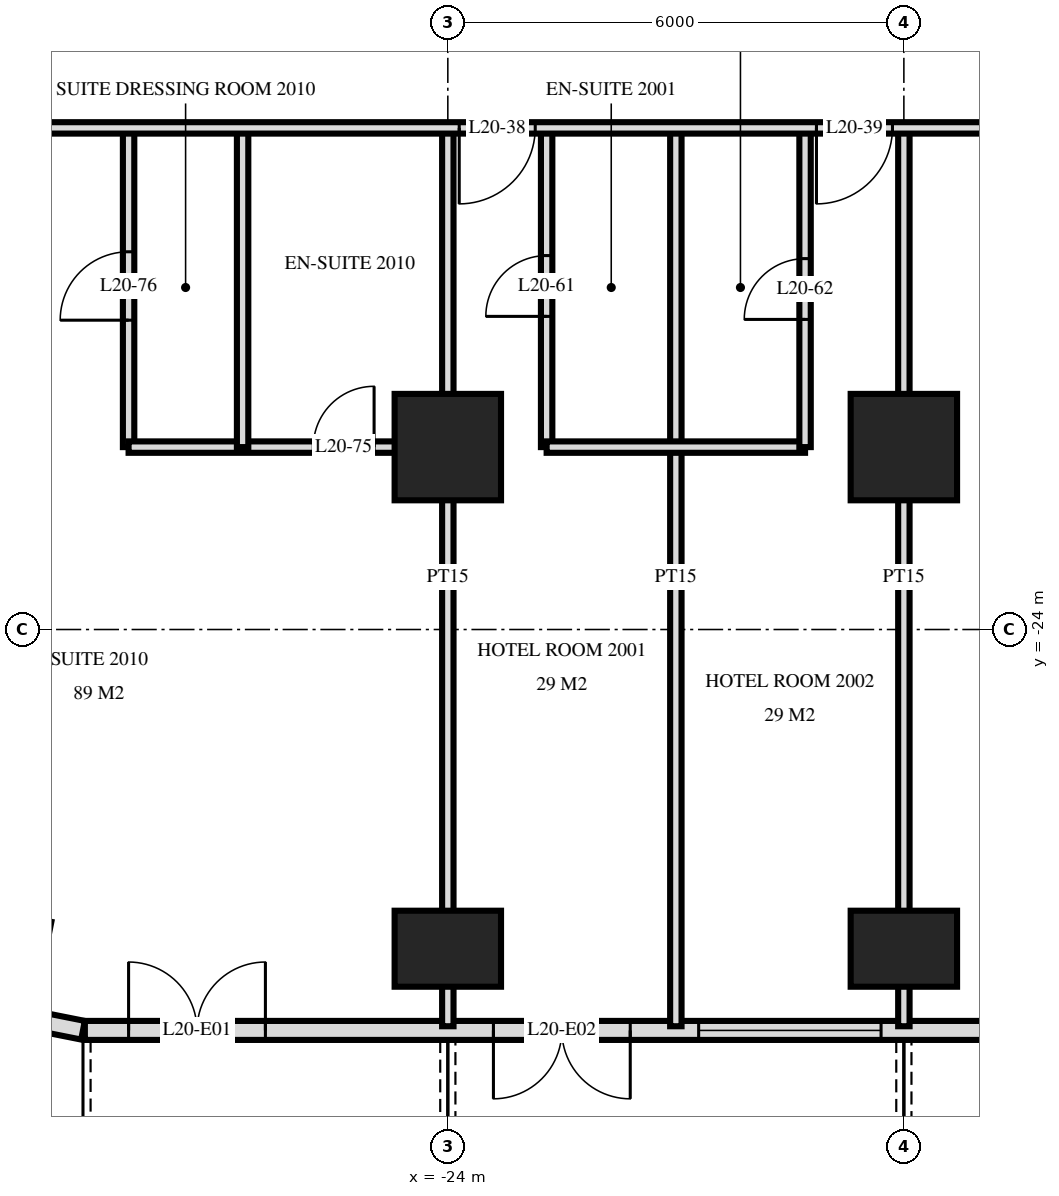
"""IFC4 building model, lengths in metres.
Left out: names, types, materials, properties, quantities, classifications, styles, units other than length and angle.
Written with IfcOpenShell. Run it as: python <this file> out.ifc"""

import sys

from ifc_helpers import new_model, si_unit, direction, frame, frame_2d, origin, origin_2d, place, context, subcontext, project, spatial, rectangle, extrude, element, fill, save


model = new_model("IFC4")
c1 = context("Model", 3, precision=1e-05, world=origin(), true_north=direction((0.0, 1.0)))
c2 = subcontext(c1, "Body", "Model", "MODEL_VIEW")
j1 = project(units=[si_unit("LENGTHUNIT", "METRE"), si_unit("PLANEANGLEUNIT", "RADIAN")], contexts=[c1])
p1 = place(None, origin())
s1 = spatial("IfcSite", under=j1, at=p1, CompositionType="ELEMENT")
p2 = place(p1, origin())
s2 = spatial("IfcBuilding", under=s1, at=p2, CompositionType="ELEMENT")
p3 = place(p2, frame((0.0, 0.0, 81.6)))
s3 = spatial("IfcBuildingStorey", under=s2, at=p3, CompositionType="ELEMENT", Elevation=81.6)
p4 = place(p3, frame((-24.0, -28.2, 0.0), z_axis=(0.0, 0.0, 1.0), x_axis=(1.0, 0.0, 0.0)))
e1 = element("IfcColumn", 1, at=p4, inside=s3, PredefinedType="COLUMN", context=c2, shape_type="SweptSolid", body=[
    extrude(rectangle(XDim=1.4, YDim=1.0, at=origin_2d()), origin(), (0.0, 0.0, 1.0), 3.6),
])
p5 = place(p3, frame((-24.0, -21.6, 0.0), z_axis=(0.0, 0.0, 1.0), x_axis=(1.0, 0.0, 0.0)))
e2 = element("IfcColumn", 2, at=p5, inside=s3, PredefinedType="COLUMN", context=c2, shape_type="SweptSolid", body=[
    extrude(rectangle(XDim=1.4, YDim=1.4, at=origin_2d()), origin(), (0.0, 0.0, 1.0), 3.6),
])
p6 = place(p3, frame((-18.0, -28.2, 0.0), z_axis=(0.0, 0.0, 1.0), x_axis=(1.0, 0.0, 0.0)))
e3 = element("IfcColumn", 3, at=p6, inside=s3, PredefinedType="COLUMN", context=c2, shape_type="SweptSolid", body=[
    extrude(rectangle(XDim=1.4, YDim=1.0, at=origin_2d()), origin(), (0.0, 0.0, 1.0), 3.6),
])
p7 = place(p3, frame((-18.0, -21.6, 0.0), z_axis=(0.0, 0.0, 1.0), x_axis=(1.0, 0.0, 0.0)))
e4 = element("IfcColumn", 4, at=p7, inside=s3, PredefinedType="COLUMN", context=c2, shape_type="SweptSolid", body=[
    extrude(rectangle(XDim=1.4, YDim=1.4, at=origin_2d()), origin(), (0.0, 0.0, 1.0), 3.6),
])
p8 = place(p3, frame((-30.449, -28.945, 0.0), z_axis=(0.0, 0.0, 1.0), x_axis=(0.980775640221, -0.19513878023, 0.0)))
e5 = element("IfcWall", 5, at=p8, inside=s3, PredefinedType="SOLIDWALL", context=c2, shape_type="SweptSolid", body=[
    extrude(rectangle(XDim=1.681, YDim=0.25, at=frame_2d((0.841, 0.0))), origin(), (0.0, 0.0, 1.0), 3.32),
])
p9 = place(p3, frame((-28.775, -29.275, 0.0), z_axis=(0.0, 0.0, 1.0), x_axis=(1.0, 0.0, 0.0)))
e6 = element("IfcWall", 6, at=p9, inside=s3, PredefinedType="SOLIDWALL", context=c2, shape_type="SweptSolid", body=[
    extrude(rectangle(XDim=57.551, YDim=0.25, at=frame_2d((28.775, 0.0))), origin(), (0.0, 0.0, 1.0), 3.32),
])
p10 = place(p9, frame((0.575, 0.0, 0.0)))
e7 = element("IfcOpeningElement", 7, at=p10, cuts=e6, PredefinedType="OPENING", context=c2, shape_type="SweptSolid", body=[
    extrude(rectangle(XDim=1.8, YDim=2.4, at=frame_2d((0.9, 1.2))), frame((0.0, 0.135, 0.0), z_axis=(0.0, -1.0, 0.0), x_axis=(1.0, 0.0, 0.0)), (0.0, 0.0, 1.0), 0.27),
])
p11 = place(p9, frame((5.375, 0.0, 0.0)))
e8 = element("IfcOpeningElement", 8, at=p11, cuts=e6, PredefinedType="OPENING", context=c2, shape_type="SweptSolid", body=[
    extrude(rectangle(XDim=1.8, YDim=2.4, at=frame_2d((0.9, 1.2))), frame((0.0, 0.135, 0.0), z_axis=(0.0, -1.0, 0.0), x_axis=(1.0, 0.0, 0.0)), (0.0, 0.0, 1.0), 0.27),
])
p12 = place(p9, frame((8.075, 0.0, 0.3)))
e9 = element("IfcOpeningElement", 9, at=p12, cuts=e6, PredefinedType="OPENING", context=c2, shape_type="SweptSolid", body=[
    extrude(rectangle(XDim=2.4, YDim=2.1, at=frame_2d((1.2, 1.05))), frame((0.0, 0.135, 0.0), z_axis=(0.0, -1.0, 0.0), x_axis=(1.0, 0.0, 0.0)), (0.0, 0.0, 1.0), 0.27),
])
p13 = place(p9, frame((12.875, 0.0, 0.0)))
e10 = element("IfcOpeningElement", 10, at=p13, cuts=e6, PredefinedType="OPENING", context=c2, shape_type="SweptSolid", body=[
    extrude(rectangle(XDim=1.8, YDim=2.4, at=frame_2d((0.9, 1.2))), frame((0.0, 0.135, 0.0), z_axis=(0.0, -1.0, 0.0), x_axis=(1.0, 0.0, 0.0)), (0.0, 0.0, 1.0), 0.27),
])
p14 = place(p9, frame((17.375, 0.0, 0.0)))
e11 = element("IfcOpeningElement", 11, at=p14, cuts=e6, PredefinedType="OPENING", context=c2, shape_type="SweptSolid", body=[
    extrude(rectangle(XDim=1.8, YDim=2.4, at=frame_2d((0.9, 1.2))), frame((0.0, 0.135, 0.0), z_axis=(0.0, -1.0, 0.0), x_axis=(1.0, 0.0, 0.0)), (0.0, 0.0, 1.0), 0.27),
])
p15 = place(p9, frame((20.075, 0.0, 0.3)))
e12 = element("IfcOpeningElement", 12, at=p15, cuts=e6, PredefinedType="OPENING", context=c2, shape_type="SweptSolid", body=[
    extrude(rectangle(XDim=2.4, YDim=2.1, at=frame_2d((1.2, 1.05))), frame((0.0, 0.135, 0.0), z_axis=(0.0, -1.0, 0.0), x_axis=(1.0, 0.0, 0.0)), (0.0, 0.0, 1.0), 0.27),
])
p16 = place(p9, frame((23.075, 0.0, 0.3)))
e13 = element("IfcOpeningElement", 13, at=p16, cuts=e6, PredefinedType="OPENING", context=c2, shape_type="SweptSolid", body=[
    extrude(rectangle(XDim=2.4, YDim=2.1, at=frame_2d((1.2, 1.05))), frame((0.0, 0.135, 0.0), z_axis=(0.0, -1.0, 0.0), x_axis=(1.0, 0.0, 0.0)), (0.0, 0.0, 1.0), 0.27),
])
p17 = place(p9, frame((26.375, 0.0, 0.0)))
e14 = element("IfcOpeningElement", 14, at=p17, cuts=e6, PredefinedType="OPENING", context=c2, shape_type="SweptSolid", body=[
    extrude(rectangle(XDim=1.8, YDim=2.4, at=frame_2d((0.9, 1.2))), frame((0.0, 0.135, 0.0), z_axis=(0.0, -1.0, 0.0), x_axis=(1.0, 0.0, 0.0)), (0.0, 0.0, 1.0), 0.27),
])
p18 = place(p9, frame((29.075, 0.0, 0.3)))
e15 = element("IfcOpeningElement", 15, at=p18, cuts=e6, PredefinedType="OPENING", context=c2, shape_type="SweptSolid", body=[
    extrude(rectangle(XDim=2.4, YDim=2.1, at=frame_2d((1.2, 1.05))), frame((0.0, 0.135, 0.0), z_axis=(0.0, -1.0, 0.0), x_axis=(1.0, 0.0, 0.0)), (0.0, 0.0, 1.0), 0.27),
])
p19 = place(p9, frame((32.375, 0.0, 0.0)))
e16 = element("IfcOpeningElement", 16, at=p19, cuts=e6, PredefinedType="OPENING", context=c2, shape_type="SweptSolid", body=[
    extrude(rectangle(XDim=1.8, YDim=2.4, at=frame_2d((0.9, 1.2))), frame((0.0, 0.135, 0.0), z_axis=(0.0, -1.0, 0.0), x_axis=(1.0, 0.0, 0.0)), (0.0, 0.0, 1.0), 0.27),
])
p20 = place(p9, frame((35.375, 0.0, 0.0)))
e17 = element("IfcOpeningElement", 17, at=p20, cuts=e6, PredefinedType="OPENING", context=c2, shape_type="SweptSolid", body=[
    extrude(rectangle(XDim=1.8, YDim=2.4, at=frame_2d((0.9, 1.2))), frame((0.0, 0.135, 0.0), z_axis=(0.0, -1.0, 0.0), x_axis=(1.0, 0.0, 0.0)), (0.0, 0.0, 1.0), 0.27),
])
p21 = place(p9, frame((38.075, 0.0, 0.3)))
e18 = element("IfcOpeningElement", 18, at=p21, cuts=e6, PredefinedType="OPENING", context=c2, shape_type="SweptSolid", body=[
    extrude(rectangle(XDim=2.4, YDim=2.1, at=frame_2d((1.2, 1.05))), frame((0.0, 0.135, 0.0), z_axis=(0.0, -1.0, 0.0), x_axis=(1.0, 0.0, 0.0)), (0.0, 0.0, 1.0), 0.27),
])
p22 = place(p9, frame((41.375, 0.0, 0.0)))
e19 = element("IfcOpeningElement", 19, at=p22, cuts=e6, PredefinedType="OPENING", context=c2, shape_type="SweptSolid", body=[
    extrude(rectangle(XDim=1.8, YDim=2.4, at=frame_2d((0.9, 1.2))), frame((0.0, 0.135, 0.0), z_axis=(0.0, -1.0, 0.0), x_axis=(1.0, 0.0, 0.0)), (0.0, 0.0, 1.0), 0.27),
])
p23 = place(p9, frame((44.075, 0.0, 0.3)))
e20 = element("IfcOpeningElement", 20, at=p23, cuts=e6, PredefinedType="OPENING", context=c2, shape_type="SweptSolid", body=[
    extrude(rectangle(XDim=2.4, YDim=2.1, at=frame_2d((1.2, 1.05))), frame((0.0, 0.135, 0.0), z_axis=(0.0, -1.0, 0.0), x_axis=(1.0, 0.0, 0.0)), (0.0, 0.0, 1.0), 0.27),
])
p24 = place(p9, frame((47.075, 0.0, 0.3)))
e21 = element("IfcOpeningElement", 21, at=p24, cuts=e6, PredefinedType="OPENING", context=c2, shape_type="SweptSolid", body=[
    extrude(rectangle(XDim=2.4, YDim=2.1, at=frame_2d((1.2, 1.05))), frame((0.0, 0.135, 0.0), z_axis=(0.0, -1.0, 0.0), x_axis=(1.0, 0.0, 0.0)), (0.0, 0.0, 1.0), 0.27),
])
p25 = place(p9, frame((50.375, 0.0, 0.0)))
e22 = element("IfcOpeningElement", 22, at=p25, cuts=e6, PredefinedType="OPENING", context=c2, shape_type="SweptSolid", body=[
    extrude(rectangle(XDim=1.8, YDim=2.4, at=frame_2d((0.9, 1.2))), frame((0.0, 0.135, 0.0), z_axis=(0.0, -1.0, 0.0), x_axis=(1.0, 0.0, 0.0)), (0.0, 0.0, 1.0), 0.27),
])
p26 = place(p9, frame((53.375, 0.0, 0.0)))
e23 = element("IfcOpeningElement", 23, at=p26, cuts=e6, PredefinedType="OPENING", context=c2, shape_type="SweptSolid", body=[
    extrude(rectangle(XDim=1.8, YDim=2.4, at=frame_2d((0.9, 1.2))), frame((0.0, 0.135, 0.0), z_axis=(0.0, -1.0, 0.0), x_axis=(1.0, 0.0, 0.0)), (0.0, 0.0, 1.0), 0.27),
])
p27 = place(p3, frame((-18.0, -29.22, 0.0), z_axis=(0.0, 0.0, 1.0), x_axis=(0.0, 1.0, 0.0)))
e24 = element("IfcWall", 24, at=p27, inside=s3, PredefinedType="PARTITIONING", context=c2, shape_type="SweptSolid", body=[
    extrude(rectangle(XDim=11.82, YDim=0.15, at=frame_2d((5.91, 0.0))), origin(), (0.0, 0.0, 1.0), 3.32),
])
p28 = place(p3, frame((-19.3, -21.6, 0.0), z_axis=(0.0, 0.0, 1.0), x_axis=(0.0, 1.0, 0.0)))
e25 = element("IfcWall", 25, at=p28, inside=s3, PredefinedType="PARTITIONING", context=c2, shape_type="SweptSolid", body=[
    extrude(rectangle(XDim=4.2, YDim=0.15, at=frame_2d((2.1, 0.0))), origin(), (0.0, 0.0, 1.0), 3.32),
])
p29 = place(p28, frame((1.68, 0.0, 0.0)))
e26 = element("IfcOpeningElement", 26, at=p29, cuts=e25, PredefinedType="OPENING", context=c2, shape_type="SweptSolid", body=[
    extrude(rectangle(XDim=0.8, YDim=2.1, at=frame_2d((0.4, 1.05))), frame((0.0, 0.085, 0.0), z_axis=(0.0, -1.0, 0.0), x_axis=(1.0, 0.0, 0.0)), (0.0, 0.0, 1.0), 0.17),
])
p30 = place(p3, frame((-21.0, -29.22, 0.0), z_axis=(0.0, 0.0, 1.0), x_axis=(0.0, 1.0, 0.0)))
e27 = element("IfcWall", 27, at=p30, inside=s3, PredefinedType="PARTITIONING", context=c2, shape_type="SweptSolid", body=[
    extrude(rectangle(XDim=11.82, YDim=0.15, at=frame_2d((5.91, 0.0))), origin(), (0.0, 0.0, 1.0), 3.32),
])
p31 = place(p3, frame((-22.7, -21.6, 0.0), z_axis=(0.0, 0.0, 1.0), x_axis=(0.0, 1.0, 0.0)))
e28 = element("IfcWall", 28, at=p31, inside=s3, PredefinedType="PARTITIONING", context=c2, shape_type="SweptSolid", body=[
    extrude(rectangle(XDim=4.2, YDim=0.15, at=frame_2d((2.1, 0.0))), origin(), (0.0, 0.0, 1.0), 3.32),
])
p32 = place(p31, frame((1.72, 0.0, 0.0)))
e29 = element("IfcOpeningElement", 29, at=p32, cuts=e28, PredefinedType="OPENING", context=c2, shape_type="SweptSolid", body=[
    extrude(rectangle(XDim=0.8, YDim=2.1, at=frame_2d((0.4, 1.05))), frame((0.0, 0.085, 0.0), z_axis=(0.0, -1.0, 0.0), x_axis=(1.0, 0.0, 0.0)), (0.0, 0.0, 1.0), 0.17),
])
p33 = place(p3, frame((-24.0, -29.22, 0.0), z_axis=(0.0, 0.0, 1.0), x_axis=(0.0, 1.0, 0.0)))
e30 = element("IfcWall", 30, at=p33, inside=s3, PredefinedType="PARTITIONING", context=c2, shape_type="SweptSolid", body=[
    extrude(rectangle(XDim=11.82, YDim=0.15, at=frame_2d((5.91, 0.0))), origin(), (0.0, 0.0, 1.0), 3.32),
])
p34 = place(p3, frame((-26.7, -21.6, 0.0), z_axis=(0.0, 0.0, 1.0), x_axis=(0.0, 1.0, 0.0)))
e31 = element("IfcWall", 31, at=p34, inside=s3, PredefinedType="PARTITIONING", context=c2, shape_type="SweptSolid", body=[
    extrude(rectangle(XDim=4.2, YDim=0.15, at=frame_2d((2.1, 0.0))), origin(), (0.0, 0.0, 1.0), 3.32),
])
p35 = place(p3, frame((-28.2, -21.6, 0.0), z_axis=(0.0, 0.0, 1.0), x_axis=(0.0, 1.0, 0.0)))
e32 = element("IfcWall", 32, at=p35, inside=s3, PredefinedType="PARTITIONING", context=c2, shape_type="SweptSolid", body=[
    extrude(rectangle(XDim=4.2, YDim=0.15, at=frame_2d((2.1, 0.0))), origin(), (0.0, 0.0, 1.0), 3.32),
])
p36 = place(p35, frame((1.67, 0.0, 0.0)))
e33 = element("IfcOpeningElement", 33, at=p36, cuts=e32, PredefinedType="OPENING", context=c2, shape_type="SweptSolid", body=[
    extrude(rectangle(XDim=0.9, YDim=2.1, at=frame_2d((0.45, 1.05))), frame((0.0, 0.085, 0.0), z_axis=(0.0, -1.0, 0.0), x_axis=(1.0, 0.0, 0.0)), (0.0, 0.0, 1.0), 0.17),
])
p37 = place(p3, frame((-28.2, -21.6, 0.0), z_axis=(0.0, 0.0, 1.0), x_axis=(1.0, 0.0, 0.0)))
e34 = element("IfcWall", 34, at=p37, inside=s3, PredefinedType="PARTITIONING", context=c2, shape_type="SweptSolid", body=[
    extrude(rectangle(XDim=4.2, YDim=0.15, at=frame_2d((2.1, 0.0))), origin(), (0.0, 0.0, 1.0), 3.32),
])
p38 = place(p37, frame((2.43, 0.0, 0.0)))
e35 = element("IfcOpeningElement", 35, at=p38, cuts=e34, PredefinedType="OPENING", context=c2, shape_type="SweptSolid", body=[
    extrude(rectangle(XDim=0.8, YDim=2.1, at=frame_2d((0.4, 1.05))), frame((0.0, 0.085, 0.0), z_axis=(0.0, -1.0, 0.0), x_axis=(1.0, 0.0, 0.0)), (0.0, 0.0, 1.0), 0.17),
])
p39 = place(p3, frame((-22.7, -21.6, 0.0), z_axis=(0.0, 0.0, 1.0), x_axis=(1.0, 0.0, 0.0)))
e36 = element("IfcWall", 36, at=p39, inside=s3, PredefinedType="PARTITIONING", context=c2, shape_type="SweptSolid", body=[
    extrude(rectangle(XDim=3.4, YDim=0.15, at=frame_2d((1.7, 0.0))), origin(), (0.0, 0.0, 1.0), 3.32),
])
p40 = place(p3, frame((-33.12, -17.4, 0.0), z_axis=(0.0, 0.0, 1.0), x_axis=(1.0, 0.0, 0.0)))
e37 = element("IfcWall", 37, at=p40, inside=s3, PredefinedType="PARTITIONING", context=c2, shape_type="SweptSolid", body=[
    extrude(rectangle(XDim=66.24, YDim=0.15, at=frame_2d((33.12, 0.0))), origin(), (0.0, 0.0, 1.0), 3.32),
])
p41 = place(p40, frame((9.27, 0.0, 0.0)))
e38 = element("IfcOpeningElement", 38, at=p41, cuts=e37, PredefinedType="OPENING", context=c2, shape_type="SweptSolid", body=[
    extrude(rectangle(XDim=1.0, YDim=2.1, at=frame_2d((0.5, 1.05))), frame((0.0, 0.085, 0.0), z_axis=(0.0, -1.0, 0.0), x_axis=(1.0, 0.0, 0.0)), (0.0, 0.0, 1.0), 0.17),
])
p42 = place(p40, frame((13.97, 0.0, 0.0)))
e39 = element("IfcOpeningElement", 39, at=p42, cuts=e37, PredefinedType="OPENING", context=c2, shape_type="SweptSolid", body=[
    extrude(rectangle(XDim=1.0, YDim=2.1, at=frame_2d((0.5, 1.05))), frame((0.0, 0.085, 0.0), z_axis=(0.0, -1.0, 0.0), x_axis=(1.0, 0.0, 0.0)), (0.0, 0.0, 1.0), 0.17),
])
p43 = place(p40, frame((17.62, 0.0, 0.0)))
e40 = element("IfcOpeningElement", 40, at=p43, cuts=e37, PredefinedType="OPENING", context=c2, shape_type="SweptSolid", body=[
    extrude(rectangle(XDim=1.0, YDim=2.1, at=frame_2d((0.5, 1.05))), frame((0.0, 0.085, 0.0), z_axis=(0.0, -1.0, 0.0), x_axis=(1.0, 0.0, 0.0)), (0.0, 0.0, 1.0), 0.17),
])
p44 = place(p40, frame((21.27, 0.0, 0.0)))
e41 = element("IfcOpeningElement", 41, at=p44, cuts=e37, PredefinedType="OPENING", context=c2, shape_type="SweptSolid", body=[
    extrude(rectangle(XDim=1.0, YDim=2.1, at=frame_2d((0.5, 1.05))), frame((0.0, 0.085, 0.0), z_axis=(0.0, -1.0, 0.0), x_axis=(1.0, 0.0, 0.0)), (0.0, 0.0, 1.0), 0.17),
])
p45 = place(p40, frame((25.97, 0.0, 0.0)))
e42 = element("IfcOpeningElement", 42, at=p45, cuts=e37, PredefinedType="OPENING", context=c2, shape_type="SweptSolid", body=[
    extrude(rectangle(XDim=1.0, YDim=2.1, at=frame_2d((0.5, 1.05))), frame((0.0, 0.085, 0.0), z_axis=(0.0, -1.0, 0.0), x_axis=(1.0, 0.0, 0.0)), (0.0, 0.0, 1.0), 0.17),
])
p46 = place(p40, frame((35.62, 0.0, 0.0)))
e43 = element("IfcOpeningElement", 43, at=p46, cuts=e37, PredefinedType="OPENING", context=c2, shape_type="SweptSolid", body=[
    extrude(rectangle(XDim=1.0, YDim=2.1, at=frame_2d((0.5, 1.05))), frame((0.0, 0.085, 0.0), z_axis=(0.0, -1.0, 0.0), x_axis=(1.0, 0.0, 0.0)), (0.0, 0.0, 1.0), 0.17),
])
p47 = place(p40, frame((40.97, 0.0, 0.0)))
e44 = element("IfcOpeningElement", 44, at=p47, cuts=e37, PredefinedType="OPENING", context=c2, shape_type="SweptSolid", body=[
    extrude(rectangle(XDim=1.0, YDim=2.1, at=frame_2d((0.5, 1.05))), frame((0.0, 0.085, 0.0), z_axis=(0.0, -1.0, 0.0), x_axis=(1.0, 0.0, 0.0)), (0.0, 0.0, 1.0), 0.17),
])
p48 = place(p40, frame((42.27, 0.0, 0.0)))
e45 = element("IfcOpeningElement", 45, at=p48, cuts=e37, PredefinedType="OPENING", context=c2, shape_type="SweptSolid", body=[
    extrude(rectangle(XDim=1.0, YDim=2.1, at=frame_2d((0.5, 1.05))), frame((0.0, 0.085, 0.0), z_axis=(0.0, -1.0, 0.0), x_axis=(1.0, 0.0, 0.0)), (0.0, 0.0, 1.0), 0.17),
])
p49 = place(p40, frame((46.97, 0.0, 0.0)))
e46 = element("IfcOpeningElement", 46, at=p49, cuts=e37, PredefinedType="OPENING", context=c2, shape_type="SweptSolid", body=[
    extrude(rectangle(XDim=1.0, YDim=2.1, at=frame_2d((0.5, 1.05))), frame((0.0, 0.085, 0.0), z_axis=(0.0, -1.0, 0.0), x_axis=(1.0, 0.0, 0.0)), (0.0, 0.0, 1.0), 0.17),
])
p50 = place(p40, frame((48.27, 0.0, 0.0)))
e47 = element("IfcOpeningElement", 47, at=p50, cuts=e37, PredefinedType="OPENING", context=c2, shape_type="SweptSolid", body=[
    extrude(rectangle(XDim=1.0, YDim=2.1, at=frame_2d((0.5, 1.05))), frame((0.0, 0.085, 0.0), z_axis=(0.0, -1.0, 0.0), x_axis=(1.0, 0.0, 0.0)), (0.0, 0.0, 1.0), 0.17),
])
p51 = place(p40, frame((1.87, 0.0, 0.0)))
e48 = element("IfcOpeningElement", 48, at=p51, cuts=e37, PredefinedType="OPENING", context=c2, shape_type="SweptSolid", body=[
    extrude(rectangle(XDim=1.0, YDim=2.1, at=frame_2d((0.5, 1.05))), frame((0.0, 0.085, 0.0), z_axis=(0.0, -1.0, 0.0), x_axis=(1.0, 0.0, 0.0)), (0.0, 0.0, 1.0), 0.17),
])
p52 = place(p40, frame((60.37, 0.0, 0.0)))
e49 = element("IfcOpeningElement", 49, at=p52, cuts=e37, PredefinedType="OPENING", context=c2, shape_type="SweptSolid", body=[
    extrude(rectangle(XDim=1.0, YDim=2.1, at=frame_2d((0.5, 1.05))), frame((0.0, 0.085, 0.0), z_axis=(0.0, -1.0, 0.0), x_axis=(1.0, 0.0, 0.0)), (0.0, 0.0, 1.0), 0.17),
])
p53 = place(p10, origin())
e50 = element("IfcDoor", 50, at=p53, inside=s3, OperationType="DOUBLE_DOOR_SINGLE_SWING", PredefinedType="DOOR", context=c2, shape_type="SweptSolid", body=[
    extrude(rectangle(XDim=1.8, YDim=2.4, at=frame_2d((0.9, 1.2))), frame((0.0, 0.025, 0.0), z_axis=(0.0, -1.0, 0.0), x_axis=(1.0, 0.0, 0.0)), (0.0, 0.0, 1.0), 0.05),
])
fill(e7, e50)
p54 = place(p11, frame((0.9, 0.0, 0.0), z_axis=(0.0, 0.0, 1.0), x_axis=(-1.0, 0.0, 0.0)))
e51 = element("IfcDoor", 51, at=p54, inside=s3, OperationType="DOUBLE_DOOR_SINGLE_SWING", PredefinedType="DOOR", context=c2, shape_type="SweptSolid", body=[
    extrude(rectangle(XDim=1.8, YDim=2.4, at=frame_2d((0.0, 1.2))), frame((0.0, -0.025, 0.0), z_axis=(0.0, 1.0, 0.0), x_axis=(-1.0, 0.0, 0.0)), (0.0, 0.0, 1.0), 0.05),
])
fill(e8, e51)
p55 = place(p12, origin())
e52 = element("IfcWindow", 52, at=p55, inside=s3, PartitioningType="SINGLE_PANEL", PredefinedType="WINDOW", context=c2, shape_type="SweptSolid", body=[
    extrude(rectangle(XDim=2.4, YDim=2.1, at=frame_2d((1.2, 1.05))), frame((0.0, 0.03, 0.0), z_axis=(0.0, -1.0, 0.0), x_axis=(1.0, 0.0, 0.0)), (0.0, 0.0, 1.0), 0.06),
])
fill(e9, e52)
p56 = place(p41, frame((0.5, 0.0, 0.0), z_axis=(0.0, 0.0, 1.0), x_axis=(-1.0, 0.0, 0.0)))
e53 = element("IfcDoor", 53, at=p56, inside=s3, OperationType="SINGLE_SWING_LEFT", PredefinedType="DOOR", context=c2, shape_type="SweptSolid", body=[
    extrude(rectangle(XDim=1.0, YDim=2.1, at=frame_2d((0.0, 1.05))), frame((0.0, -0.025, 0.0), z_axis=(0.0, 1.0, 0.0), x_axis=(-1.0, 0.0, 0.0)), (0.0, 0.0, 1.0), 0.05),
])
fill(e38, e53)
p57 = place(p42, frame((0.5, 0.0, 0.0), z_axis=(0.0, 0.0, 1.0), x_axis=(-1.0, 0.0, 0.0)))
e54 = element("IfcDoor", 54, at=p57, inside=s3, OperationType="SINGLE_SWING_LEFT", PredefinedType="DOOR", context=c2, shape_type="SweptSolid", body=[
    extrude(rectangle(XDim=1.0, YDim=2.1, at=frame_2d((0.0, 1.05))), frame((0.0, -0.025, 0.0), z_axis=(0.0, 1.0, 0.0), x_axis=(-1.0, 0.0, 0.0)), (0.0, 0.0, 1.0), 0.05),
])
fill(e39, e54)
p58 = place(p32, origin())
e55 = element("IfcDoor", 55, at=p58, inside=s3, OperationType="SINGLE_SWING_RIGHT", PredefinedType="DOOR", context=c2, shape_type="SweptSolid", body=[
    extrude(rectangle(XDim=0.8, YDim=2.1, at=frame_2d((0.4, 1.05))), frame((0.0, 0.025, 0.0), z_axis=(0.0, -1.0, 0.0), x_axis=(1.0, 0.0, 0.0)), (0.0, 0.0, 1.0), 0.05),
])
fill(e29, e55)
p59 = place(p29, origin())
e56 = element("IfcDoor", 56, at=p59, inside=s3, OperationType="SINGLE_SWING_RIGHT", PredefinedType="DOOR", context=c2, shape_type="SweptSolid", body=[
    extrude(rectangle(XDim=0.8, YDim=2.1, at=frame_2d((0.4, 1.05))), frame((0.0, 0.025, 0.0), z_axis=(0.0, -1.0, 0.0), x_axis=(1.0, 0.0, 0.0)), (0.0, 0.0, 1.0), 0.05),
])
fill(e26, e56)
p60 = place(p38, origin())
e57 = element("IfcDoor", 57, at=p60, inside=s3, OperationType="SINGLE_SWING_LEFT", PredefinedType="DOOR", context=c2, shape_type="SweptSolid", body=[
    extrude(rectangle(XDim=0.8, YDim=2.1, at=frame_2d((0.4, 1.05))), frame((0.0, 0.025, 0.0), z_axis=(0.0, -1.0, 0.0), x_axis=(1.0, 0.0, 0.0)), (0.0, 0.0, 1.0), 0.05),
])
fill(e35, e57)
p61 = place(p36, origin())
e58 = element("IfcDoor", 58, at=p61, inside=s3, OperationType="SINGLE_SWING_RIGHT", PredefinedType="DOOR", context=c2, shape_type="SweptSolid", body=[
    extrude(rectangle(XDim=0.9, YDim=2.1, at=frame_2d((0.45, 1.05))), frame((0.0, 0.025, 0.0), z_axis=(0.0, -1.0, 0.0), x_axis=(1.0, 0.0, 0.0)), (0.0, 0.0, 1.0), 0.05),
])
fill(e33, e58)
save(model, sys.argv[1])
